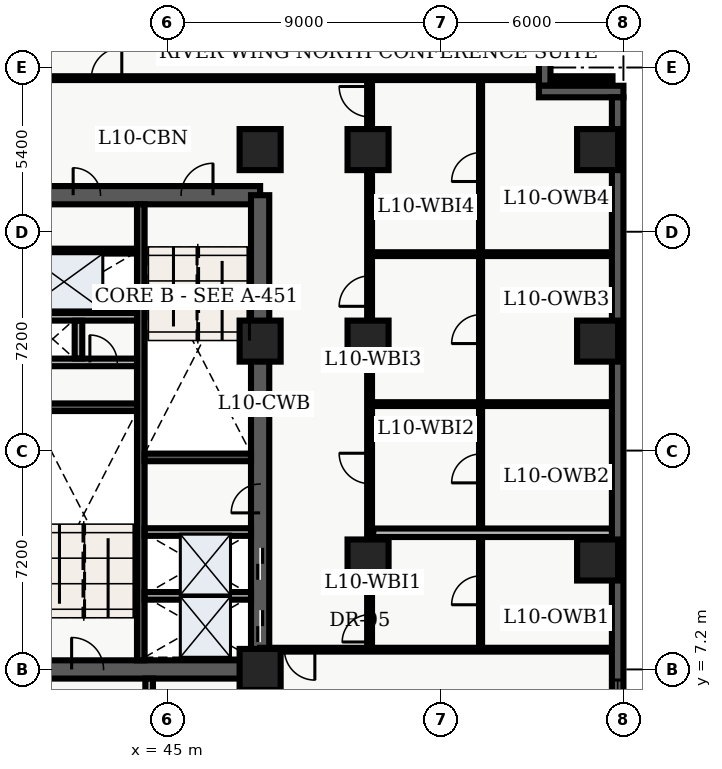
"""IFC4 building model, lengths in metres.
Left out: names, types, materials, properties, quantities, classifications, styles, units other than length and angle.
Written with IfcOpenShell. Run it as: python <this file> out.ifc"""

import sys

from ifc_helpers import new_model, entity, si_unit, converted_unit, direction, frame, origin_with_axes, origin_2d_with_axis, place, context, subcontext, project, spatial, polyline, rectangle, outline, extrude, element, fill, save


model = new_model("IFC4")
c1 = context("Model", 3, precision=1e-05, world=origin_with_axes(), true_north=direction((0.0, 1.0)))
c2 = subcontext(c1, "Body", "Model", "MODEL_VIEW")
j1 = project(units=[si_unit("LENGTHUNIT", "METRE"), converted_unit("PLANEANGLEUNIT", "DEGREE", entity("IfcPlaneAngleMeasure", 0.017), si_unit("PLANEANGLEUNIT", "RADIAN"), dimensions=[0, 0, 0, 0, 0, 0, 0])], contexts=[c1])
p1 = place(None, origin_with_axes())
s1 = spatial("IfcSite", under=j1, at=p1, CompositionType="ELEMENT")
p2 = place(p1, origin_with_axes())
s2 = spatial("IfcBuilding", under=s1, at=p2, CompositionType="ELEMENT")
p3 = place(p2, frame((0.0, 0.0, 44.4), z_axis=(0.0, 0.0, 1.0), x_axis=(1.0, 0.0, 0.0)))
s3 = spatial("IfcBuildingStorey", under=s2, at=p3, CompositionType="ELEMENT", Elevation=44.4)
p4 = place(p3, frame((40.2, 7.2, 0.0), z_axis=(0.0, 0.0, 1.0), x_axis=(1.0, 0.0, 0.0)))
e1 = element("IfcWall", 1, at=p4, inside=s3, PredefinedType="SHEAR", context=c2, shape_type="SweptSolid", body=[
    extrude(outline(polyline([(0.0, -0.3), (7.85, -0.3), (7.85, 0.3), (0.0, 0.3), (0.0, -0.3)])), origin_with_axes(), (0.0, 0.0, 1.0), 3.66),
])
p5 = place(p4, frame((2.175, 0.0, 0.0), z_axis=(0.0, 0.0, 1.0), x_axis=(1.0, 0.0, 0.0)))
e2 = element("IfcOpeningElement", 2, at=p5, cuts=e1, PredefinedType="OPENING", context=c2, shape_type="SweptSolid", body=[
    extrude(rectangle(XDim=1.05, YDim=0.62, at=origin_2d_with_axis()), origin_with_axes(), (0.0, 0.0, 1.0), 2.15),
])
p6 = place(p3, frame((40.2, 22.8, 0.0), z_axis=(0.0, 0.0, 1.0), x_axis=(1.0, 0.0, 0.0)))
e3 = element("IfcWall", 3, at=p6, inside=s3, PredefinedType="SHEAR", context=c2, shape_type="SweptSolid", body=[
    extrude(outline(polyline([(0.0, -0.3), (7.85, -0.3), (7.85, 0.3), (0.0, 0.3), (0.0, -0.3)])), origin_with_axes(), (0.0, 0.0, 1.0), 3.66),
])
p7 = place(p6, frame((5.775, 0.0, 0.0), z_axis=(0.0, 0.0, 1.0), x_axis=(1.0, 0.0, 0.0)))
e4 = element("IfcOpeningElement", 4, at=p7, cuts=e3, PredefinedType="OPENING", context=c2, shape_type="SweptSolid", body=[
    extrude(rectangle(XDim=1.05, YDim=0.62, at=origin_2d_with_axis()), origin_with_axes(), (0.0, 0.0, 1.0), 2.15),
])
p8 = place(p6, frame((2.15, 0.0, 0.0), z_axis=(0.0, 0.0, 1.0), x_axis=(1.0, 0.0, 0.0)))
e5 = element("IfcOpeningElement", 5, at=p8, cuts=e3, PredefinedType="OPENING", context=c2, shape_type="SweptSolid", body=[
    extrude(rectangle(XDim=0.9, YDim=0.62, at=origin_2d_with_axis()), origin_with_axes(), (0.0, 0.0, 1.0), 2.15),
])
p9 = place(p3, frame((48.05, 7.2, 0.0), z_axis=(0.0, 0.0, 1.0), x_axis=(0.0, 1.0, 0.0)))
e6 = element("IfcWall", 6, at=p9, inside=s3, PredefinedType="SHEAR", context=c2, shape_type="SweptSolid", body=[
    extrude(outline(polyline([(0.0, -0.3), (15.6, -0.3), (15.6, 0.3), (0.0, 0.3), (0.0, -0.3)])), origin_with_axes(), (0.0, 0.0, 1.0), 3.66),
])
p10 = place(p9, frame((1.425, 0.0, 0.0), z_axis=(0.0, 0.0, 1.0), x_axis=(1.0, 0.0, 0.0)))
e7 = element("IfcOpeningElement", 7, at=p10, cuts=e6, PredefinedType="OPENING", context=c2, shape_type="SweptSolid", body=[
    extrude(rectangle(XDim=1.05, YDim=0.62, at=origin_2d_with_axis()), origin_with_axes(), (0.0, 0.0, 1.0), 2.15),
])
p11 = place(p9, frame((3.475, 0.0, 0.0), z_axis=(0.0, 0.0, 1.0), x_axis=(1.0, 0.0, 0.0)))
e8 = element("IfcOpeningElement", 8, at=p11, cuts=e6, PredefinedType="OPENING", context=c2, shape_type="SweptSolid", body=[
    extrude(rectangle(XDim=1.05, YDim=0.62, at=origin_2d_with_axis()), origin_with_axes(), (0.0, 0.0, 1.0), 2.15),
])
p12 = place(p9, frame((5.625, 0.0, 0.0), z_axis=(0.0, 0.0, 1.0), x_axis=(1.0, 0.0, 0.0)))
e9 = element("IfcOpeningElement", 9, at=p12, cuts=e6, PredefinedType="OPENING", context=c2, shape_type="SweptSolid", body=[
    extrude(rectangle(XDim=0.95, YDim=0.62, at=origin_2d_with_axis()), origin_with_axes(), (0.0, 0.0, 1.0), 2.15),
])
p13 = place(p3, frame((44.125, 7.5, 0.0), z_axis=(0.0, 0.0, 1.0), x_axis=(0.0, 1.0, 0.0)))
e10 = element("IfcWall", 10, at=p13, inside=s3, PredefinedType="SHEAR", context=c2, shape_type="SweptSolid", body=[
    extrude(outline(polyline([(0.0, -0.125), (15.0, -0.125), (15.0, 0.125), (0.0, 0.125), (0.0, -0.125)])), origin_with_axes(), (0.0, 0.0, 1.0), 3.66),
])
for number, where, z_axis, x_axis in (
    (11, (40.5, 15.825, 0.0), (0.0, 0.0, 1.0), (1.0, 0.0, 0.0)),
    (12, (44.25, 14.175, 0.0), (0.0, 0.0, 1.0), (1.0, 0.0, 0.0)),
):
    element("IfcWall", number, at=place(p3, frame(where, z_axis=z_axis, x_axis=x_axis)), inside=s3, PredefinedType="SHEAR", context=c2, shape_type="SweptSolid", body=[
        extrude(outline(polyline([(0.0, -0.125), (3.5, -0.125), (3.5, 0.125), (0.0, 0.125), (0.0, -0.125)])), origin_with_axes(), (0.0, 0.0, 1.0), 3.66),
    ])
p14 = place(p3, frame((40.5, 17.3, 0.0), z_axis=(0.0, 0.0, 1.0), x_axis=(1.0, 0.0, 0.0)))
e13 = element("IfcWall", 13, at=p14, inside=s3, PredefinedType="SOLIDWALL", context=c2, shape_type="SweptSolid", body=[
    extrude(outline(polyline([(0.0, -0.125), (3.5, -0.125), (3.5, 0.125), (0.0, 0.125), (0.0, -0.125)])), origin_with_axes(), (0.0, 0.0, 1.0), 2.7),
])
p15 = place(p14, frame((2.4, 0.0, 0.0), z_axis=(0.0, 0.0, 1.0), x_axis=(1.0, 0.0, 0.0)))
e14 = element("IfcOpeningElement", 14, at=p15, cuts=e13, PredefinedType="OPENING", context=c2, shape_type="SweptSolid", body=[
    extrude(rectangle(XDim=0.9, YDim=0.27, at=origin_2d_with_axis()), origin_with_axes(), (0.0, 0.0, 1.0), 2.15),
])
p16 = place(p3, frame((40.5, 18.8, 0.0), z_axis=(0.0, 0.0, 1.0), x_axis=(1.0, 0.0, 0.0)))
e15 = element("IfcWall", 15, at=p16, inside=s3, PredefinedType="SOLIDWALL", context=c2, shape_type="SweptSolid", body=[
    extrude(outline(polyline([(0.0, -0.125), (3.5, -0.125), (3.5, 0.125), (0.0, 0.125), (0.0, -0.125)])), origin_with_axes(), (0.0, 0.0, 1.0), 2.7),
])
p17 = place(p3, frame((42.075, 17.43, 0.0), z_axis=(0.0, 0.0, 1.0), x_axis=(0.0, 1.0, 0.0)))
e16 = element("IfcWall", 16, at=p17, inside=s3, PredefinedType="SOLIDWALL", context=c2, shape_type="SweptSolid", body=[
    extrude(outline(polyline([(0.0, -0.125), (1.24, -0.125), (1.24, 0.125), (0.0, 0.125), (0.0, -0.125)])), origin_with_axes(), (0.0, 0.0, 1.0), 2.7),
])
p18 = place(p3, frame((44.4, 3.1, 0.0), z_axis=(0.0, 0.0, 1.0), x_axis=(0.0, 1.0, 0.0)))
e17 = element("IfcWall", 17, at=p18, inside=s3, PredefinedType="SOLIDWALL", context=c2, shape_type="SweptSolid", body=[
    extrude(outline(polyline([(0.0, -0.125), (3.8, -0.125), (3.8, 0.125), (0.0, 0.125), (0.0, -0.125)])), origin_with_axes(), (0.0, 0.0, 1.0), 2.7),
])
for number, where, z_axis, x_axis in (
    (18, (48.05, 7.2, 0.0), (0.0, 0.0, 1.0), (1.0, 0.0, 0.0)),
    (19, (48.05, 18.0, 0.0), (0.0, 0.0, 1.0), (1.0, 0.0, 0.0)),
    (20, (48.05, 24.3, 0.0), (0.0, 0.0, 1.0), (1.0, 0.0, 0.0)),
    (21, (51.6, 10.8, 0.0), (0.0, 0.0, 1.0), (1.0, 0.0, 0.0)),
    (22, (51.6, 18.0, 0.0), (0.0, 0.0, 1.0), (1.0, 0.0, 0.0)),
    (23, (51.6, 24.3, 0.0), (0.0, 0.0, 1.0), (1.0, 0.0, 0.0)),
    (24, (59.15, 10.8, 0.0), (0.0, 0.0, 1.0), (1.0, 0.0, 0.0)),
    (25, (59.15, 18.0, 0.0), (0.0, 0.0, 1.0), (1.0, 0.0, 0.0)),
    (26, (59.15, 24.3, 0.0), (0.0, 0.0, 1.0), (1.0, 0.0, 0.0)),
):
    element("IfcColumn", number, at=place(p3, frame(where, z_axis=z_axis, x_axis=x_axis)), inside=s3, PredefinedType="COLUMN", context=c2, shape_type="SweptSolid", body=[
        extrude(rectangle(XDim=1.35, YDim=1.35, at=origin_2d_with_axis()), origin_with_axes(), (0.0, 0.0, 1.0), 3.9),
    ])
p19 = place(p3, frame((40.5, 20.96, 0.0), z_axis=(0.0, 0.0, 1.0), x_axis=(1.0, 0.0, 0.0)))
e27 = element("IfcWall", 27, at=p19, inside=s3, PredefinedType="PARTITIONING", context=c2, shape_type="SweptSolid", body=[
    extrude(outline(polyline([(0.0, -0.08), (3.5, -0.08), (3.5, 0.08), (0.0, 0.08), (0.0, -0.08)])), origin_with_axes(), (0.0, 0.0, 1.0), 2.7),
])
for number, where, z_axis, x_axis in (
    (28, (44.25, 9.62, 0.0), (0.0, 0.0, 1.0), (1.0, 0.0, 0.0)),
    (29, (44.25, 11.72, 0.0), (0.0, 0.0, 1.0), (1.0, 0.0, 0.0)),
):
    element("IfcWall", number, at=place(p3, frame(where, z_axis=z_axis, x_axis=x_axis)), inside=s3, PredefinedType="SOLIDWALL", context=c2, shape_type="SweptSolid", body=[
        extrude(outline(polyline([(0.0, -0.125), (3.5, -0.125), (3.5, 0.125), (0.0, 0.125), (0.0, -0.125)])), origin_with_axes(), (0.0, 0.0, 1.0), 2.7),
    ])
p20 = place(p3, frame((51.65, 7.85, 0.0), z_axis=(0.0, 0.0, 1.0), x_axis=(0.0, 1.0, 0.0)))
e30 = element("IfcWall", 30, at=p20, inside=s3, PredefinedType="PARTITIONING", context=c2, shape_type="SweptSolid", body=[
    extrude(outline(polyline([(0.0, -0.08), (18.8, -0.08), (18.8, 0.08), (0.0, 0.08), (0.0, -0.08)])), origin_with_axes(), (0.0, 0.0, 1.0), 2.7),
])
p21 = place(p20, frame((0.703, 0.0, 0.0), z_axis=(0.0, 0.0, 1.0), x_axis=(1.0, 0.0, 0.0)))
e31 = element("IfcOpeningElement", 31, at=p21, cuts=e30, PredefinedType="OPENING", context=c2, shape_type="SweptSolid", body=[
    extrude(rectangle(XDim=0.9, YDim=0.18, at=origin_2d_with_axis()), origin_with_axes(), (0.0, 0.0, 1.0), 2.15),
])
p22 = place(p20, frame((5.962, 0.0, 0.0), z_axis=(0.0, 0.0, 1.0), x_axis=(1.0, 0.0, 0.0)))
e32 = element("IfcOpeningElement", 32, at=p22, cuts=e30, PredefinedType="OPENING", context=c2, shape_type="SweptSolid", body=[
    extrude(rectangle(XDim=1.0, YDim=0.18, at=origin_2d_with_axis()), origin_with_axes(), (0.0, 0.0, 1.0), 2.15),
])
p23 = place(p20, frame((11.795, 0.0, 0.0), z_axis=(0.0, 0.0, 1.0), x_axis=(1.0, 0.0, 0.0)))
e33 = element("IfcOpeningElement", 33, at=p23, cuts=e30, PredefinedType="OPENING", context=c2, shape_type="SweptSolid", body=[
    extrude(rectangle(XDim=1.0, YDim=0.18, at=origin_2d_with_axis()), origin_with_axes(), (0.0, 0.0, 1.0), 2.15),
])
p24 = place(p20, frame((18.026, 0.0, 0.0), z_axis=(0.0, 0.0, 1.0), x_axis=(1.0, 0.0, 0.0)))
e34 = element("IfcOpeningElement", 34, at=p24, cuts=e30, PredefinedType="OPENING", context=c2, shape_type="SweptSolid", body=[
    extrude(rectangle(XDim=1.0, YDim=0.18, at=origin_2d_with_axis()), origin_with_axes(), (0.0, 0.0, 1.0), 2.15),
])
p25 = place(p3, frame((59.64, 7.85, 0.0), z_axis=(0.0, 0.0, 1.0), x_axis=(-1.0, 0.0, 0.0)))
e35 = element("IfcWall", 35, at=p25, inside=s3, PredefinedType="PARTITIONING", context=c2, shape_type="SweptSolid", body=[
    extrude(outline(polyline([(0.0, -0.062), (11.59, -0.062), (11.59, 0.062), (0.0, 0.062), (0.0, -0.062)])), origin_with_axes(), (0.0, 0.0, 1.0), 2.7),
])
p26 = place(p25, frame((10.29, 0.0, 0.0), z_axis=(0.0, 0.0, 1.0), x_axis=(1.0, 0.0, 0.0)))
e36 = element("IfcOpeningElement", 36, at=p26, cuts=e35, PredefinedType="OPENING", context=c2, shape_type="SweptSolid", body=[
    extrude(rectangle(XDim=1.0, YDim=0.145, at=origin_2d_with_axis()), origin_with_axes(), (0.0, 0.0, 1.0), 2.15),
])
p27 = place(p3, frame((38.76, 26.65, 0.0), z_axis=(0.0, 0.0, 1.0), x_axis=(1.0, 0.0, 0.0)))
e37 = element("IfcWall", 37, at=p27, inside=s3, PredefinedType="PARTITIONING", context=c2, shape_type="SweptSolid", body=[
    extrude(outline(polyline([(0.0, -0.062), (20.88, -0.062), (20.88, 0.062), (0.0, 0.062), (0.0, -0.062)])), origin_with_axes(), (0.0, 0.0, 1.0), 2.7),
])
p28 = place(p27, frame((4.24, 0.0, 0.0), z_axis=(0.0, 0.0, 1.0), x_axis=(1.0, 0.0, 0.0)))
e38 = element("IfcOpeningElement", 38, at=p28, cuts=e37, PredefinedType="OPENING", context=c2, shape_type="SweptSolid", body=[
    extrude(rectangle(XDim=1.0, YDim=0.145, at=origin_2d_with_axis()), origin_with_axes(), (0.0, 0.0, 1.0), 2.15),
])
p29 = place(p3, frame((55.3, 7.98, 0.0), z_axis=(0.0, 0.0, 1.0), x_axis=(0.0, 1.0, 0.0)))
e39 = element("IfcWall", 39, at=p29, inside=s3, PredefinedType="PARTITIONING", context=c2, shape_type="SweptSolid", body=[
    extrude(outline(polyline([(0.0, -0.05), (18.54, -0.05), (18.54, 0.05), (0.0, 0.05), (0.0, -0.05)])), origin_with_axes(), (0.0, 0.0, 1.0), 2.7),
])
p30 = place(p29, frame((1.823, 0.0, 0.0), z_axis=(0.0, 0.0, 1.0), x_axis=(1.0, 0.0, 0.0)))
e40 = element("IfcOpeningElement", 40, at=p30, cuts=e39, PredefinedType="OPENING", context=c2, shape_type="SweptSolid", body=[
    extrude(rectangle(XDim=0.95, YDim=0.12, at=origin_2d_with_axis()), origin_with_axes(), (0.0, 0.0, 1.0), 2.15),
])
p31 = place(p29, frame((5.832, 0.0, 0.0), z_axis=(0.0, 0.0, 1.0), x_axis=(1.0, 0.0, 0.0)))
e41 = element("IfcOpeningElement", 41, at=p31, cuts=e39, PredefinedType="OPENING", context=c2, shape_type="SweptSolid", body=[
    extrude(rectangle(XDim=0.95, YDim=0.12, at=origin_2d_with_axis()), origin_with_axes(), (0.0, 0.0, 1.0), 2.15),
])
p32 = place(p29, frame((10.415, 0.0, 0.0), z_axis=(0.0, 0.0, 1.0), x_axis=(1.0, 0.0, 0.0)))
e42 = element("IfcOpeningElement", 42, at=p32, cuts=e39, PredefinedType="OPENING", context=c2, shape_type="SweptSolid", body=[
    extrude(rectangle(XDim=0.95, YDim=0.12, at=origin_2d_with_axis()), origin_with_axes(), (0.0, 0.0, 1.0), 2.15),
])
p33 = place(p29, frame((15.745, 0.0, 0.0), z_axis=(0.0, 0.0, 1.0), x_axis=(1.0, 0.0, 0.0)))
e43 = element("IfcOpeningElement", 43, at=p33, cuts=e39, PredefinedType="OPENING", context=c2, shape_type="SweptSolid", body=[
    extrude(rectangle(XDim=0.95, YDim=0.12, at=origin_2d_with_axis()), origin_with_axes(), (0.0, 0.0, 1.0), 2.15),
])
p34 = place(p3, frame((51.77, 11.696, 0.0), z_axis=(0.0, 0.0, 1.0), x_axis=(1.0, 0.0, 0.0)))
e44 = element("IfcWall", 44, at=p34, inside=s3, PredefinedType="PARTITIONING", context=c2, shape_type="SweptSolid", body=[
    extrude(outline(polyline([(0.0, -0.14), (7.855, -0.14), (7.855, 0.14), (0.0, 0.14), (0.0, -0.14)])), origin_with_axes(), (0.0, 0.0, 1.0), 2.7),
])
for number, where, z_axis, x_axis in (
    (45, (51.77, 15.928, 0.0), (0.0, 0.0, 1.0), (1.0, 0.0, 0.0)),
    (46, (51.77, 20.861, 0.0), (0.0, 0.0, 1.0), (1.0, 0.0, 0.0)),
):
    element("IfcWall", number, at=place(p3, frame(where, z_axis=z_axis, x_axis=x_axis)), inside=s3, PredefinedType="PARTITIONING", context=c2, shape_type="SweptSolid", body=[
        extrude(outline(polyline([(0.0, -0.062), (7.855, -0.062), (7.855, 0.062), (0.0, 0.062), (0.0, -0.062)])), origin_with_axes(), (0.0, 0.0, 1.0), 2.7),
    ])
p35 = place(p3, frame((57.41, 28.42, 0.0), z_axis=(0.0, 0.0, 1.0), x_axis=(0.0, -1.0, 0.0)))
e47 = element("IfcWall", 47, at=p35, inside=s3, PredefinedType="SOLIDWALL", context=c2, shape_type="SweptSolid", body=[
    extrude(outline(polyline([(0.0, -0.19), (2.02, -0.19), (2.02, 0.19), (0.0, 0.19), (0.0, -0.19)])), origin_with_axes(), (0.0, 0.0, 1.0), 3.66),
])
p36 = place(p3, frame((57.22, 26.21, 0.0), z_axis=(0.0, 0.0, 1.0), x_axis=(1.0, 0.0, 0.0)))
e48 = element("IfcWall", 48, at=p36, inside=s3, PredefinedType="SOLIDWALL", context=c2, shape_type="SweptSolid", body=[
    extrude(outline(polyline([(0.0, -0.19), (2.78, -0.19), (2.78, 0.19), (0.0, 0.19), (0.0, -0.19)])), origin_with_axes(), (0.0, 0.0, 1.0), 3.66),
])
p37 = place(p3, frame((59.81, 26.02, 0.0), z_axis=(0.0, 0.0, 1.0), x_axis=(0.0, -1.0, 0.0)))
e49 = element("IfcWall", 49, at=p37, inside=s3, PredefinedType="SOLIDWALL", context=c2, shape_type="SweptSolid", body=[
    extrude(outline(polyline([(0.0, -0.19), (23.62, -0.19), (23.62, 0.19), (0.0, 0.19), (0.0, -0.19)])), origin_with_axes(), (0.0, 0.0, 1.0), 3.66),
])
p38 = place(p37, frame((20.218, 0.0, 0.45), z_axis=(0.0, 0.0, 1.0), x_axis=(1.0, 0.0, 0.0)))
e50 = element("IfcOpeningElement", 50, at=p38, cuts=e49, PredefinedType="OPENING", context=c2, shape_type="SweptSolid", body=[
    extrude(rectangle(XDim=2.1, YDim=0.4, at=origin_2d_with_axis()), origin_with_axes(), (0.0, 0.0, 1.0), 2.2),
])
p39 = place(p9, frame((1.425, 0.0, 0.0), z_axis=(0.0, 0.0, 1.0), x_axis=(1.0, 0.0, 0.0)))
e51 = element("IfcDoor", 51, at=p39, inside=s3, OperationType="SLIDING_TO_LEFT", PredefinedType="DOOR", context=c2, shape_type="SweptSolid", body=[
    extrude(rectangle(XDim=1.05, YDim=0.09, at=origin_2d_with_axis()), origin_with_axes(), (0.0, 0.0, 1.0), 2.15),
])
fill(e7, e51)
p40 = place(p9, frame((3.475, 0.0, 0.0), z_axis=(0.0, 0.0, 1.0), x_axis=(1.0, 0.0, 0.0)))
e52 = element("IfcDoor", 52, at=p40, inside=s3, OperationType="SLIDING_TO_RIGHT", PredefinedType="DOOR", context=c2, shape_type="SweptSolid", body=[
    extrude(rectangle(XDim=1.05, YDim=0.09, at=origin_2d_with_axis()), origin_with_axes(), (0.0, 0.0, 1.0), 2.15),
])
fill(e8, e52)
p41 = place(p14, frame((2.4, 0.0, 0.0), z_axis=(0.0, 0.0, 1.0), x_axis=(1.0, 0.0, 0.0)))
e53 = element("IfcDoor", 53, at=p41, inside=s3, OperationType="SINGLE_SWING_LEFT", PredefinedType="DOOR", context=c2, shape_type="SweptSolid", body=[
    extrude(rectangle(XDim=0.9, YDim=0.09, at=origin_2d_with_axis()), origin_with_axes(), (0.0, 0.0, 1.0), 2.15),
])
fill(e14, e53)
p42 = place(p4, frame((2.175, 0.0, 0.0), z_axis=(0.0, 0.0, 1.0), x_axis=(1.0, 0.0, 0.0)))
e54 = element("IfcDoor", 54, at=p42, inside=s3, OperationType="SINGLE_SWING_LEFT", PredefinedType="DOOR", context=c2, shape_type="SweptSolid", body=[
    extrude(rectangle(XDim=1.05, YDim=0.09, at=origin_2d_with_axis()), origin_with_axes(), (0.0, 0.0, 1.0), 2.15),
])
fill(e2, e54)
p43 = place(p6, frame((5.775, 0.0, 0.0), z_axis=(0.0, 0.0, 1.0), x_axis=(1.0, 0.0, 0.0)))
e55 = element("IfcDoor", 55, at=p43, inside=s3, OperationType="SINGLE_SWING_RIGHT", PredefinedType="DOOR", context=c2, shape_type="SweptSolid", body=[
    extrude(rectangle(XDim=1.05, YDim=0.09, at=origin_2d_with_axis()), origin_with_axes(), (0.0, 0.0, 1.0), 2.15),
])
fill(e4, e55)
p44 = place(p6, frame((2.15, 0.0, 0.0), z_axis=(0.0, 0.0, 1.0), x_axis=(1.0, 0.0, 0.0)))
e56 = element("IfcDoor", 56, at=p44, inside=s3, OperationType="SINGLE_SWING_LEFT", PredefinedType="DOOR", context=c2, shape_type="SweptSolid", body=[
    extrude(rectangle(XDim=0.9, YDim=0.09, at=origin_2d_with_axis()), origin_with_axes(), (0.0, 0.0, 1.0), 2.15),
])
fill(e5, e56)
p45 = place(p9, frame((5.625, 0.0, 0.0), z_axis=(0.0, 0.0, 1.0), x_axis=(1.0, 0.0, 0.0)))
e57 = element("IfcDoor", 57, at=p45, inside=s3, OperationType="SINGLE_SWING_LEFT", PredefinedType="DOOR", context=c2, shape_type="SweptSolid", body=[
    extrude(rectangle(XDim=0.95, YDim=0.09, at=origin_2d_with_axis()), origin_with_axes(), (0.0, 0.0, 1.0), 2.15),
])
fill(e9, e57)
p46 = place(p25, frame((10.29, 0.0, 0.0), z_axis=(0.0, 0.0, 1.0), x_axis=(1.0, 0.0, 0.0)))
e58 = element("IfcDoor", 58, at=p46, inside=s3, OperationType="SINGLE_SWING_LEFT", PredefinedType="DOOR", context=c2, shape_type="SweptSolid", body=[
    extrude(rectangle(XDim=1.0, YDim=0.075, at=origin_2d_with_axis()), origin_with_axes(), (0.0, 0.0, 1.0), 2.15),
])
fill(e36, e58)
p47 = place(p27, frame((4.24, 0.0, 0.0), z_axis=(0.0, 0.0, 1.0), x_axis=(1.0, 0.0, 0.0)))
e59 = element("IfcDoor", 59, at=p47, inside=s3, OperationType="SINGLE_SWING_RIGHT", PredefinedType="DOOR", context=c2, shape_type="SweptSolid", body=[
    extrude(rectangle(XDim=1.0, YDim=0.075, at=origin_2d_with_axis()), origin_with_axes(), (0.0, 0.0, 1.0), 2.15),
])
fill(e38, e59)
p48 = place(p29, frame((1.823, 0.0, 0.0), z_axis=(0.0, 0.0, 1.0), x_axis=(1.0, 0.0, 0.0)))
e60 = element("IfcDoor", 60, at=p48, inside=s3, OperationType="SINGLE_SWING_LEFT", PredefinedType="DOOR", context=c2, shape_type="SweptSolid", body=[
    extrude(rectangle(XDim=0.95, YDim=0.06, at=origin_2d_with_axis()), origin_with_axes(), (0.0, 0.0, 1.0), 2.15),
])
fill(e40, e60)
p49 = place(p20, frame((0.703, 0.0, 0.0), z_axis=(0.0, 0.0, 1.0), x_axis=(1.0, 0.0, 0.0)))
e61 = element("IfcDoor", 61, at=p49, inside=s3, OperationType="SINGLE_SWING_LEFT", PredefinedType="DOOR", context=c2, shape_type="SweptSolid", body=[
    extrude(rectangle(XDim=0.9, YDim=0.09, at=origin_2d_with_axis()), origin_with_axes(), (0.0, 0.0, 1.0), 2.15),
])
fill(e31, e61)
p50 = place(p29, frame((5.832, 0.0, 0.0), z_axis=(0.0, 0.0, 1.0), x_axis=(1.0, 0.0, 0.0)))
e62 = element("IfcDoor", 62, at=p50, inside=s3, OperationType="SINGLE_SWING_LEFT", PredefinedType="DOOR", context=c2, shape_type="SweptSolid", body=[
    extrude(rectangle(XDim=0.95, YDim=0.06, at=origin_2d_with_axis()), origin_with_axes(), (0.0, 0.0, 1.0), 2.15),
])
fill(e41, e62)
p51 = place(p20, frame((5.962, 0.0, 0.0), z_axis=(0.0, 0.0, 1.0), x_axis=(1.0, 0.0, 0.0)))
e63 = element("IfcDoor", 63, at=p51, inside=s3, OperationType="SINGLE_SWING_RIGHT", PredefinedType="DOOR", context=c2, shape_type="SweptSolid", body=[
    extrude(rectangle(XDim=1.0, YDim=0.09, at=origin_2d_with_axis()), origin_with_axes(), (0.0, 0.0, 1.0), 2.15),
])
fill(e32, e63)
p52 = place(p29, frame((10.415, 0.0, 0.0), z_axis=(0.0, 0.0, 1.0), x_axis=(1.0, 0.0, 0.0)))
e64 = element("IfcDoor", 64, at=p52, inside=s3, OperationType="SINGLE_SWING_LEFT", PredefinedType="DOOR", context=c2, shape_type="SweptSolid", body=[
    extrude(rectangle(XDim=0.95, YDim=0.06, at=origin_2d_with_axis()), origin_with_axes(), (0.0, 0.0, 1.0), 2.15),
])
fill(e42, e64)
p53 = place(p20, frame((11.795, 0.0, 0.0), z_axis=(0.0, 0.0, 1.0), x_axis=(1.0, 0.0, 0.0)))
e65 = element("IfcDoor", 65, at=p53, inside=s3, OperationType="SINGLE_SWING_LEFT", PredefinedType="DOOR", context=c2, shape_type="SweptSolid", body=[
    extrude(rectangle(XDim=1.0, YDim=0.09, at=origin_2d_with_axis()), origin_with_axes(), (0.0, 0.0, 1.0), 2.15),
])
fill(e33, e65)
p54 = place(p29, frame((15.745, 0.0, 0.0), z_axis=(0.0, 0.0, 1.0), x_axis=(1.0, 0.0, 0.0)))
e66 = element("IfcDoor", 66, at=p54, inside=s3, OperationType="SINGLE_SWING_LEFT", PredefinedType="DOOR", context=c2, shape_type="SweptSolid", body=[
    extrude(rectangle(XDim=0.95, YDim=0.06, at=origin_2d_with_axis()), origin_with_axes(), (0.0, 0.0, 1.0), 2.15),
])
fill(e43, e66)
p55 = place(p20, frame((18.026, 0.0, 0.0), z_axis=(0.0, 0.0, 1.0), x_axis=(1.0, 0.0, 0.0)))
e67 = element("IfcDoor", 67, at=p55, inside=s3, OperationType="SINGLE_SWING_RIGHT", PredefinedType="DOOR", context=c2, shape_type="SweptSolid", body=[
    extrude(rectangle(XDim=1.0, YDim=0.09, at=origin_2d_with_axis()), origin_with_axes(), (0.0, 0.0, 1.0), 2.15),
])
fill(e34, e67)
p56 = place(p37, frame((20.218, 0.0, 0.45), z_axis=(0.0, 0.0, 1.0), x_axis=(1.0, 0.0, 0.0)))
e68 = element("IfcWindow", 68, at=p56, inside=s3, PredefinedType="WINDOW", context=c2, shape_type="SweptSolid", body=[
    extrude(rectangle(XDim=2.1, YDim=0.09, at=origin_2d_with_axis()), origin_with_axes(), (0.0, 0.0, 1.0), 2.2),
])
fill(e50, e68)
save(model, sys.argv[1])
